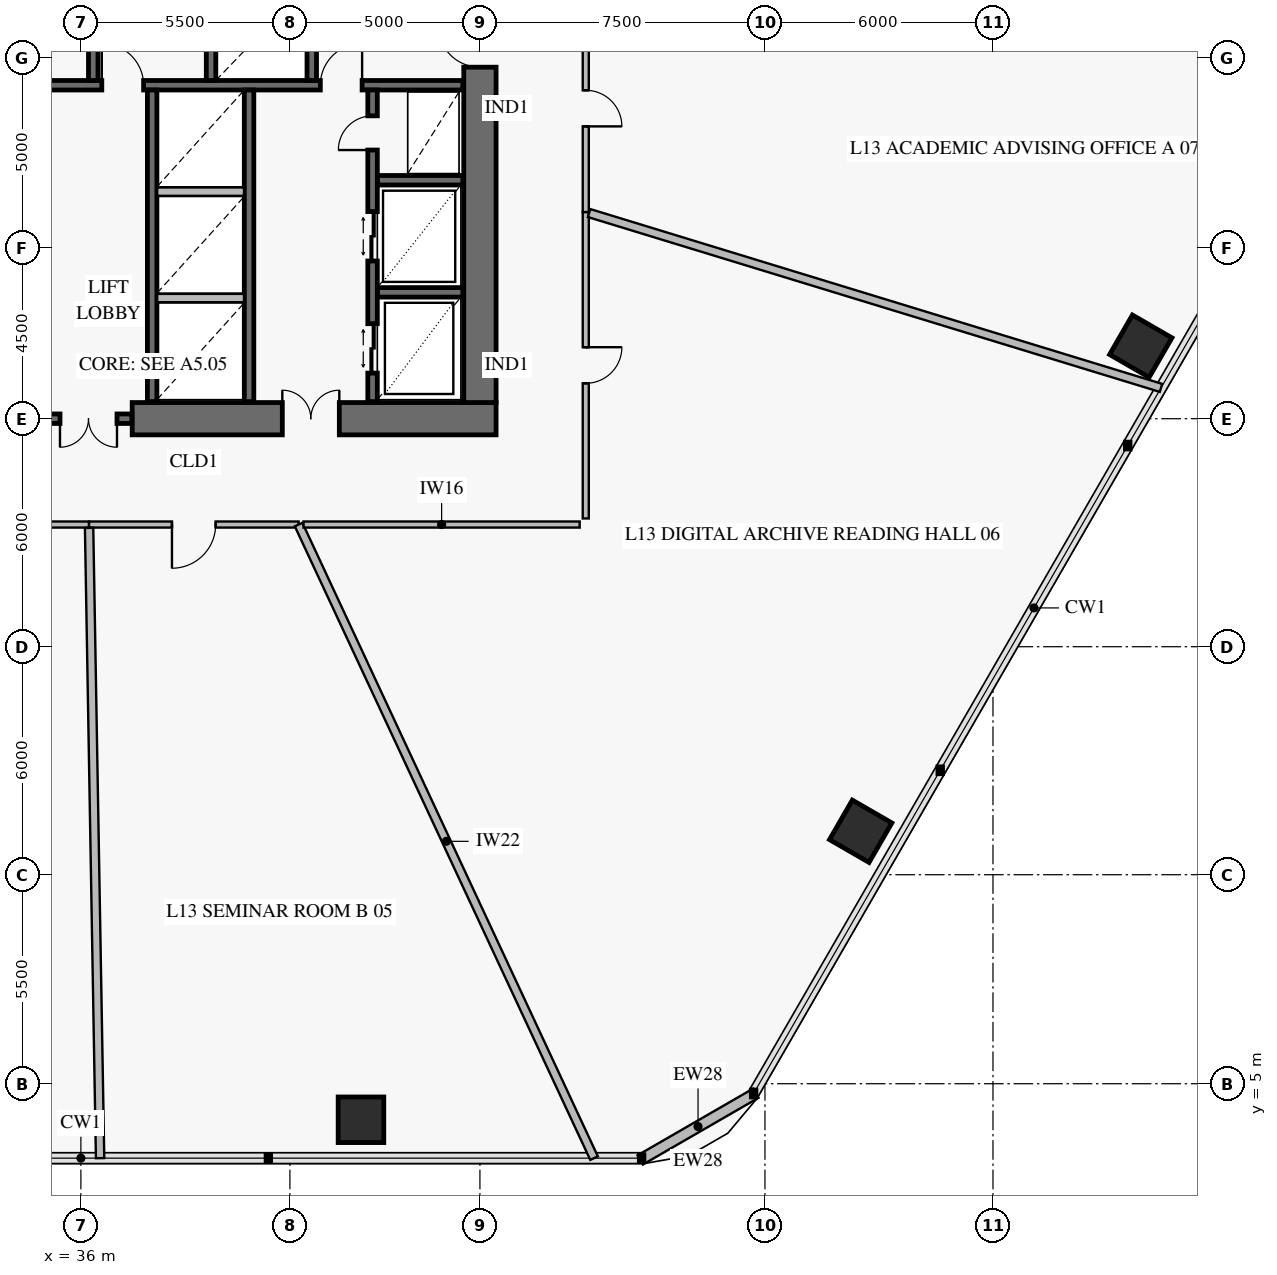
"""IFC4 building model, lengths in metres.
Left out: names, types, materials, properties, quantities, classifications, styles, units other than length and angle.
Written with IfcOpenShell. Run it as: python <this file> out.ifc"""

import sys

from ifc_helpers import new_model, si_unit, direction, frame, frame_2d, origin, origin_2d, place, context, subcontext, project, spatial, rectangle, extrude, element, fill, save


model = new_model("IFC4")
c1 = context("Model", 3, precision=1e-05, world=origin(), true_north=direction((0.0, 1.0)))
c2 = subcontext(c1, "Body", "Model", "MODEL_VIEW")
j1 = project(units=[si_unit("LENGTHUNIT", "METRE"), si_unit("PLANEANGLEUNIT", "RADIAN")], contexts=[c1])
p1 = place(None, origin())
s1 = spatial("IfcSite", under=j1, at=p1, CompositionType="ELEMENT")
p2 = place(p1, origin())
s2 = spatial("IfcBuilding", under=s1, at=p2, CompositionType="ELEMENT")
p3 = place(p2, frame((0.0, 0.0, 54.0)))
s3 = spatial("IfcBuildingStorey", under=s2, at=p3, CompositionType="ELEMENT", Elevation=54.0)
p4 = place(p3, frame((37.35, 22.5, 0.0), z_axis=(0.0, 0.0, 1.0), x_axis=(1.0, 0.0, 0.0)))
e1 = element("IfcWall", 1, at=p4, inside=s3, PredefinedType="SHEAR", context=c2, shape_type="SweptSolid", body=[
    extrude(rectangle(XDim=9.575, YDim=0.85, at=frame_2d((4.788, 0.0))), origin(), (0.0, 0.0, 1.0), 4.2),
])
p5 = place(p4, frame((3.95, 0.0, 0.0)))
e2 = element("IfcOpeningElement", 2, at=p5, cuts=e1, PredefinedType="OPENING", context=c2, shape_type="SweptSolid", body=[
    extrude(rectangle(XDim=1.5, YDim=2.15, at=frame_2d((0.75, 1.075))), frame((0.0, 0.437, 0.0), z_axis=(0.0, -1.0, 0.0), x_axis=(1.0, 0.0, 0.0)), (0.0, 0.0, 1.0), 0.874),
])
p6 = place(p3, frame((46.5, 22.925, 0.0), z_axis=(0.0, 0.0, 1.0), x_axis=(0.0, 1.0, 0.0)))
e3 = element("IfcWall", 3, at=p6, inside=s3, PredefinedType="SHEAR", context=c2, shape_type="SweptSolid", body=[
    extrude(rectangle(XDim=18.15, YDim=0.85, at=frame_2d((9.075, 0.0))), origin(), (0.0, 0.0, 1.0), 4.2),
])
p7 = place(p6, frame((8.825, 0.0, 0.0)))
e4 = element("IfcOpeningElement", 4, at=p7, cuts=e3, PredefinedType="OPENING", context=c2, shape_type="SweptSolid", body=[
    extrude(rectangle(XDim=1.1, YDim=2.15, at=frame_2d((0.55, 1.075))), frame((0.0, 0.437, 0.0), z_axis=(0.0, -1.0, 0.0), x_axis=(1.0, 0.0, 0.0)), (0.0, 0.0, 1.0), 0.874),
])
for number, where, z_axis, x_axis in (
    (5, (43.37, 4.052, 0.0), (0.0, 0.0, 1.0), (1.0, 0.0, 0.0)),
    (6, (56.519, 11.643, 0.0), (0.0, 0.0, 1.0), (0.5, 0.866, 0.0)),
    (7, (63.889, 24.408, 0.0), (0.0, 0.0, 1.0), (0.5, 0.866, 0.0)),
):
    element("IfcColumn", number, at=place(p3, frame(where, z_axis=z_axis, x_axis=x_axis)), inside=s3, PredefinedType="COLUMN", context=c2, shape_type="SweptSolid", body=[
        extrude(rectangle(XDim=1.2, YDim=1.2, at=origin_2d()), origin(), (0.0, 0.0, 1.0), 3.92),
    ])
p8 = place(p3, frame((53.761, 4.751, 0.0), z_axis=(0.0, 0.0, 1.0), x_axis=(-0.866007452331, -0.500031091541, 0.0)))
e8 = element("IfcWall", 8, at=p8, inside=s3, PredefinedType="SOLIDWALL", context=c2, shape_type="SweptSolid", body=[
    extrude(rectangle(XDim=3.515, YDim=0.28, at=frame_2d((1.757, 0.0))), origin(), (0.0, 0.0, 1.0), 3.92),
])
p9 = place(p3, frame((35.06, 22.5, 0.0), z_axis=(0.0, 0.0, 1.0), x_axis=(1.0, 0.0, 0.0)))
e9 = element("IfcWall", 9, at=p9, inside=s3, PredefinedType="SOLIDWALL", context=c2, shape_type="SweptSolid", body=[
    extrude(rectangle(XDim=2.28, YDim=0.25, at=frame_2d((1.14, 0.0))), origin(), (0.0, 0.0, 1.0), 4.2),
])
p10 = place(p9, frame((0.39, 0.0, 0.0)))
e10 = element("IfcOpeningElement", 10, at=p10, cuts=e9, PredefinedType="OPENING", context=c2, shape_type="SweptSolid", body=[
    extrude(rectangle(XDim=1.5, YDim=2.15, at=frame_2d((0.75, 1.075))), frame((0.0, 0.137, 0.0), z_axis=(0.0, -1.0, 0.0), x_axis=(1.0, 0.0, 0.0)), (0.0, 0.0, 1.0), 0.274),
])
p11 = place(p3, frame((25.95, 31.275, 0.0), z_axis=(0.0, 0.0, 1.0), x_axis=(1.0, 0.0, 0.0)))
e11 = element("IfcWall", 11, at=p11, inside=s3, PredefinedType="SOLIDWALL", context=c2, shape_type="SweptSolid", body=[
    extrude(rectangle(XDim=20.1, YDim=0.25, at=frame_2d((10.05, 0.0))), origin(), (0.0, 0.0, 1.0), 4.2),
])
p12 = place(p11, frame((2.6, 0.0, 0.0)))
e12 = element("IfcOpeningElement", 12, at=p12, cuts=e11, PredefinedType="OPENING", context=c2, shape_type="SweptSolid", body=[
    extrude(rectangle(XDim=1.1, YDim=2.15, at=frame_2d((0.55, 1.075))), frame((0.0, 0.137, 0.0), z_axis=(0.0, -1.0, 0.0), x_axis=(1.0, 0.0, 0.0)), (0.0, 0.0, 1.0), 0.274),
])
p13 = place(p11, frame((10.6, 0.0, 0.0)))
e13 = element("IfcOpeningElement", 13, at=p13, cuts=e11, PredefinedType="OPENING", context=c2, shape_type="SweptSolid", body=[
    extrude(rectangle(XDim=1.1, YDim=2.15, at=frame_2d((0.55, 1.075))), frame((0.0, 0.137, 0.0), z_axis=(0.0, -1.0, 0.0), x_axis=(1.0, 0.0, 0.0)), (0.0, 0.0, 1.0), 0.274),
])
p14 = place(p11, frame((16.35, 0.0, 0.0)))
e14 = element("IfcOpeningElement", 14, at=p14, cuts=e11, PredefinedType="OPENING", context=c2, shape_type="SweptSolid", body=[
    extrude(rectangle(XDim=1.1, YDim=2.15, at=frame_2d((0.55, 1.075))), frame((0.0, 0.137, 0.0), z_axis=(0.0, -1.0, 0.0), x_axis=(1.0, 0.0, 0.0)), (0.0, 0.0, 1.0), 0.274),
])
p15 = place(p3, frame((42.075, 31.4, 0.0), z_axis=(0.0, 0.0, 1.0), x_axis=(0.0, 1.0, 0.0)))
e15 = element("IfcWall", 15, at=p15, inside=s3, PredefinedType="SOLIDWALL", context=c2, shape_type="SweptSolid", body=[
    extrude(rectangle(XDim=9.7, YDim=0.25, at=frame_2d((4.85, 0.0))), origin(), (0.0, 0.0, 1.0), 4.2),
])
p16 = place(p3, frame((36.325, 31.4, 0.0), z_axis=(0.0, 0.0, 1.0), x_axis=(0.0, 1.0, 0.0)))
e16 = element("IfcWall", 16, at=p16, inside=s3, PredefinedType="SOLIDWALL", context=c2, shape_type="SweptSolid", body=[
    extrude(rectangle(XDim=9.65, YDim=0.25, at=frame_2d((4.825, 0.0))), origin(), (0.0, 0.0, 1.0), 4.2),
])
p17 = place(p16, frame((0.84, 0.0, 0.0)))
e17 = element("IfcOpeningElement", 17, at=p17, cuts=e16, PredefinedType="OPENING", context=c2, shape_type="SweptSolid", body=[
    extrude(rectangle(XDim=0.9, YDim=2.1, at=frame_2d((0.45, 1.05))), frame((0.0, 0.137, 0.0), z_axis=(0.0, -1.0, 0.0), x_axis=(1.0, 0.0, 0.0)), (0.0, 0.0, 1.0), 0.274),
])
p18 = place(p16, frame((4.1, 0.0, 0.0)))
e18 = element("IfcOpeningElement", 18, at=p18, cuts=e16, PredefinedType="OPENING", context=c2, shape_type="SweptSolid", body=[
    extrude(rectangle(XDim=0.9, YDim=2.1, at=frame_2d((0.45, 1.05))), frame((0.0, 0.137, 0.0), z_axis=(0.0, -1.0, 0.0), x_axis=(1.0, 0.0, 0.0)), (0.0, 0.0, 1.0), 0.274),
])
p19 = place(p16, frame((7.61, 0.0, 0.0)))
e19 = element("IfcOpeningElement", 19, at=p19, cuts=e16, PredefinedType="OPENING", context=c2, shape_type="SweptSolid", body=[
    extrude(rectangle(XDim=0.9, YDim=2.1, at=frame_2d((0.45, 1.05))), frame((0.0, 0.137, 0.0), z_axis=(0.0, -1.0, 0.0), x_axis=(1.0, 0.0, 0.0)), (0.0, 0.0, 1.0), 0.274),
])
p20 = place(p3, frame((39.425, 31.4, 0.0), z_axis=(0.0, 0.0, 1.0), x_axis=(0.0, 1.0, 0.0)))
e20 = element("IfcWall", 20, at=p20, inside=s3, PredefinedType="SOLIDWALL", context=c2, shape_type="SweptSolid", body=[
    extrude(rectangle(XDim=9.65, YDim=0.25, at=frame_2d((4.825, 0.0))), origin(), (0.0, 0.0, 1.0), 4.2),
])
p21 = place(p20, frame((8.47, 0.0, 0.0)))
e21 = element("IfcOpeningElement", 21, at=p21, cuts=e20, PredefinedType="OPENING", context=c2, shape_type="SweptSolid", body=[
    extrude(rectangle(XDim=0.9, YDim=2.1, at=frame_2d((0.45, 1.05))), frame((0.0, 0.137, 0.0), z_axis=(0.0, -1.0, 0.0), x_axis=(1.0, 0.0, 0.0)), (0.0, 0.0, 1.0), 0.274),
])
for number, where, z_axis, x_axis in (
    (22, (37.875, 22.95, 0.0), (0.0, 0.0, 1.0), (0.0, 1.0, 0.0)),
    (23, (40.425, 22.95, 0.0), (0.0, 0.0, 1.0), (0.0, 1.0, 0.0)),
):
    element("IfcWall", number, at=place(p3, frame(where, z_axis=z_axis, x_axis=x_axis)), inside=s3, PredefinedType="SOLIDWALL", context=c2, shape_type="SweptSolid", body=[
        extrude(rectangle(XDim=8.2, YDim=0.25, at=frame_2d((4.1, 0.0))), origin(), (0.0, 0.0, 1.0), 4.2),
    ])
for number, where, z_axis, x_axis in (
    (24, (43.8, 25.825, 0.0), (0.0, 0.0, 1.0), (1.0, 0.0, 0.0)),
    (25, (43.8, 28.775, 0.0), (0.0, 0.0, 1.0), (1.0, 0.0, 0.0)),
):
    element("IfcWall", number, at=place(p3, frame(where, z_axis=z_axis, x_axis=x_axis)), inside=s3, PredefinedType="SOLIDWALL", context=c2, shape_type="SweptSolid", body=[
        extrude(rectangle(XDim=2.25, YDim=0.25, at=frame_2d((1.125, 0.0))), origin(), (0.0, 0.0, 1.0), 4.2),
    ])
p22 = place(p3, frame((43.675, 22.95, 0.0), z_axis=(0.0, 0.0, 1.0), x_axis=(0.0, 1.0, 0.0)))
e26 = element("IfcWall", 26, at=p22, inside=s3, PredefinedType="SOLIDWALL", context=c2, shape_type="SweptSolid", body=[
    extrude(rectangle(XDim=8.2, YDim=0.25, at=frame_2d((4.1, 0.0))), origin(), (0.0, 0.0, 1.0), 4.2),
])
p23 = place(p22, frame((0.75, 0.0, 0.0)))
e27 = element("IfcOpeningElement", 27, at=p23, cuts=e26, PredefinedType="OPENING", context=c2, shape_type="SweptSolid", body=[
    extrude(rectangle(XDim=1.3, YDim=2.3, at=frame_2d((0.65, 1.15))), frame((0.0, 0.137, 0.0), z_axis=(0.0, -1.0, 0.0), x_axis=(1.0, 0.0, 0.0)), (0.0, 0.0, 1.0), 0.274),
])
p24 = place(p22, frame((3.7, 0.0, 0.0)))
e28 = element("IfcOpeningElement", 28, at=p24, cuts=e26, PredefinedType="OPENING", context=c2, shape_type="SweptSolid", body=[
    extrude(rectangle(XDim=1.3, YDim=2.3, at=frame_2d((0.65, 1.15))), frame((0.0, 0.137, 0.0), z_axis=(0.0, -1.0, 0.0), x_axis=(1.0, 0.0, 0.0)), (0.0, 0.0, 1.0), 0.274),
])
p25 = place(p22, frame((6.62, 0.0, 0.0)))
e29 = element("IfcOpeningElement", 29, at=p25, cuts=e26, PredefinedType="OPENING", context=c2, shape_type="SweptSolid", body=[
    extrude(rectangle(XDim=0.9, YDim=2.1, at=frame_2d((0.45, 1.05))), frame((0.0, 0.137, 0.0), z_axis=(0.0, -1.0, 0.0), x_axis=(1.0, 0.0, 0.0)), (0.0, 0.0, 1.0), 0.274),
])
p26 = place(p3, frame((30.785, 19.715, 0.0), z_axis=(0.0, 0.0, 1.0), x_axis=(1.0, 0.0, 0.0)))
e30 = element("IfcWall", 30, at=p26, inside=s3, PredefinedType="PARTITIONING", context=c2, shape_type="SweptSolid", body=[
    extrude(rectangle(XDim=5.429, YDim=0.16, at=frame_2d((2.714, 0.0))), origin(), (0.0, 0.0, 1.0), 3.22),
])
p27 = place(p26, frame((2.139, 0.0, 0.0)))
e31 = element("IfcOpeningElement", 31, at=p27, cuts=e30, PredefinedType="OPENING", context=c2, shape_type="SweptSolid", body=[
    extrude(rectangle(XDim=1.15, YDim=2.2, at=frame_2d((0.575, 1.1))), frame((0.0, 0.092, 0.0), z_axis=(0.0, -1.0, 0.0), x_axis=(1.0, 0.0, 0.0)), (0.0, 0.0, 1.0), 0.184),
])
p28 = place(p3, frame((36.214, 19.715, 0.0), z_axis=(0.0, 0.0, 1.0), x_axis=(1.0, 0.0, 0.0)))
e32 = element("IfcWall", 32, at=p28, inside=s3, PredefinedType="PARTITIONING", context=c2, shape_type="SweptSolid", body=[
    extrude(rectangle(XDim=5.514, YDim=0.16, at=frame_2d((2.757, 0.0))), origin(), (0.0, 0.0, 1.0), 3.22),
])
p29 = place(p28, frame((2.182, 0.0, 0.0)))
e33 = element("IfcOpeningElement", 33, at=p29, cuts=e32, PredefinedType="OPENING", context=c2, shape_type="SweptSolid", body=[
    extrude(rectangle(XDim=1.15, YDim=2.2, at=frame_2d((0.575, 1.1))), frame((0.0, 0.092, 0.0), z_axis=(0.0, -1.0, 0.0), x_axis=(1.0, 0.0, 0.0)), (0.0, 0.0, 1.0), 0.184),
])
p30 = place(p3, frame((49.285, 19.875, 0.0), z_axis=(0.0, 0.0, 1.0), x_axis=(0.0, 1.0, 0.0)))
e34 = element("IfcWall", 34, at=p30, inside=s3, PredefinedType="PARTITIONING", context=c2, shape_type="SweptSolid", body=[
    extrude(rectangle(XDim=8.063, YDim=0.16, at=frame_2d((4.032, 0.0))), origin(), (0.0, 0.0, 1.0), 3.92),
])
p31 = place(p30, frame((3.557, 0.0, 0.0)))
e35 = element("IfcOpeningElement", 35, at=p31, cuts=e34, PredefinedType="OPENING", context=c2, shape_type="SweptSolid", body=[
    extrude(rectangle(XDim=0.95, YDim=2.1, at=frame_2d((0.475, 1.05))), frame((0.0, 0.092, 0.0), z_axis=(0.0, -1.0, 0.0), x_axis=(1.0, 0.0, 0.0)), (0.0, 0.0, 1.0), 0.184),
])
p32 = place(p3, frame((49.285, 27.938, 0.0), z_axis=(0.0, 0.0, 1.0), x_axis=(0.0, 1.0, 0.0)))
e36 = element("IfcWall", 36, at=p32, inside=s3, PredefinedType="PARTITIONING", context=c2, shape_type="SweptSolid", body=[
    extrude(rectangle(XDim=5.458, YDim=0.16, at=frame_2d((2.729, 0.0))), origin(), (0.0, 0.0, 1.0), 3.22),
])
p33 = place(p32, frame((2.254, 0.0, 0.0)))
e37 = element("IfcOpeningElement", 37, at=p33, cuts=e36, PredefinedType="OPENING", context=c2, shape_type="SweptSolid", body=[
    extrude(rectangle(XDim=0.95, YDim=2.1, at=frame_2d((0.475, 1.05))), frame((0.0, 0.092, 0.0), z_axis=(0.0, -1.0, 0.0), x_axis=(1.0, 0.0, 0.0)), (0.0, 0.0, 1.0), 0.184),
])
for number, where, z_axis, x_axis in (
    (38, (38.008, 25.675, 0.0), (0.0, 0.0, 1.0), (1.0, 0.0, 0.0)),
    (39, (38.008, 28.475, 0.0), (0.0, 0.0, 1.0), (1.0, 0.0, 0.0)),
):
    element("IfcWall", number, at=place(p3, frame(where, z_axis=z_axis, x_axis=x_axis)), inside=s3, PredefinedType="PARTITIONING", context=c2, shape_type="SweptSolid", body=[
        extrude(rectangle(XDim=2.284, YDim=0.22, at=frame_2d((1.142, 0.0))), origin(), (0.0, 0.0, 1.0), 3.92),
    ])
p34 = place(p3, frame((36.216, 19.627, 0.0), z_axis=(0.0, 0.0, 1.0), x_axis=(0.01745546123, -0.99984764183, 0.0)))
e40 = element("IfcWall", 40, at=p34, inside=s3, PredefinedType="PARTITIONING", context=c2, shape_type="SweptSolid", body=[
    extrude(rectangle(XDim=16.588, YDim=0.22, at=frame_2d((8.294, 0.0))), origin(), (0.0, 0.0, 1.0), 3.17),
])
p35 = place(p3, frame((41.729, 19.715, 0.0), z_axis=(0.0, 0.0, 1.0), x_axis=(0.422623913369, -0.906305151617, 0.0)))
e41 = element("IfcWall", 41, at=p35, inside=s3, PredefinedType="PARTITIONING", context=c2, shape_type="SweptSolid", body=[
    extrude(rectangle(XDim=18.397, YDim=0.22, at=frame_2d((9.199, 0.0))), origin(), (0.0, 0.0, 1.0), 3.17),
])
p36 = place(p3, frame((41.859, 19.715, 0.0), z_axis=(0.0, 0.0, 1.0), x_axis=(1.0, 0.0, 0.0)))
e42 = element("IfcWall", 42, at=p36, inside=s3, PredefinedType="PARTITIONING", context=c2, shape_type="SweptSolid", body=[
    extrude(rectangle(XDim=7.266, YDim=0.16, at=frame_2d((3.633, 0.0))), origin(), (0.0, 0.0, 1.0), 3.22),
])
p37 = place(p3, frame((49.373, 27.912, 0.0), z_axis=(0.0, 0.0, 1.0), x_axis=(0.956304467386, -0.292372648614, 0.0)))
e43 = element("IfcWall", 43, at=p37, inside=s3, PredefinedType="PARTITIONING", context=c2, shape_type="SweptSolid", body=[
    extrude(rectangle(XDim=15.736, YDim=0.22, at=frame_2d((7.868, 0.0))), origin(), (0.0, 0.0, 1.0), 3.17),
])
p38 = place(p7, origin())
e44 = element("IfcDoor", 44, at=p38, inside=s3, OperationType="SINGLE_SWING_RIGHT", PredefinedType="USERDEFINED", context=c2, shape_type="SweptSolid", body=[
    extrude(rectangle(XDim=1.1, YDim=2.15, at=frame_2d((0.55, 1.075))), frame((0.0, 0.025, 0.0), z_axis=(0.0, -1.0, 0.0), x_axis=(1.0, 0.0, 0.0)), (0.0, 0.0, 1.0), 0.05),
])
fill(e4, e44)
p39 = place(p5, origin())
e45 = element("IfcDoor", 45, at=p39, inside=s3, OperationType="DOUBLE_DOOR_SINGLE_SWING", PredefinedType="DOOR", context=c2, shape_type="SweptSolid", body=[
    extrude(rectangle(XDim=1.5, YDim=2.15, at=frame_2d((0.75, 1.075))), frame((0.0, 0.025, 0.0), z_axis=(0.0, -1.0, 0.0), x_axis=(1.0, 0.0, 0.0)), (0.0, 0.0, 1.0), 0.05),
])
fill(e2, e45)
p40 = place(p10, frame((1.5, 0.0, 0.0), z_axis=(0.0, 0.0, 1.0), x_axis=(-1.0, 0.0, 0.0)))
e46 = element("IfcDoor", 46, at=p40, inside=s3, OperationType="DOUBLE_DOOR_SINGLE_SWING", PredefinedType="DOOR", context=c2, shape_type="SweptSolid", body=[
    extrude(rectangle(XDim=1.5, YDim=2.15, at=frame_2d((0.75, 1.075))), frame((0.0, 0.025, 0.0), z_axis=(0.0, -1.0, 0.0), x_axis=(1.0, 0.0, 0.0)), (0.0, 0.0, 1.0), 0.05),
])
fill(e10, e46)
p41 = place(p13, origin())
e47 = element("IfcDoor", 47, at=p41, inside=s3, OperationType="SINGLE_SWING_LEFT", PredefinedType="USERDEFINED", context=c2, shape_type="SweptSolid", body=[
    extrude(rectangle(XDim=1.1, YDim=2.15, at=frame_2d((0.55, 1.075))), frame((0.0, 0.025, 0.0), z_axis=(0.0, -1.0, 0.0), x_axis=(1.0, 0.0, 0.0)), (0.0, 0.0, 1.0), 0.05),
])
fill(e13, e47)
p42 = place(p14, origin())
e48 = element("IfcDoor", 48, at=p42, inside=s3, OperationType="SINGLE_SWING_RIGHT", PredefinedType="USERDEFINED", context=c2, shape_type="SweptSolid", body=[
    extrude(rectangle(XDim=1.1, YDim=2.15, at=frame_2d((0.55, 1.075))), frame((0.0, 0.025, 0.0), z_axis=(0.0, -1.0, 0.0), x_axis=(1.0, 0.0, 0.0)), (0.0, 0.0, 1.0), 0.05),
])
fill(e14, e48)
p43 = place(p23, origin())
e49 = element("IfcDoor", 49, at=p43, inside=s3, OperationType="DOUBLE_DOOR_SLIDING", PredefinedType="DOOR", context=c2, shape_type="SweptSolid", body=[
    extrude(rectangle(XDim=1.3, YDim=2.3, at=frame_2d((0.65, 1.15))), frame((0.0, 0.025, 0.0), z_axis=(0.0, -1.0, 0.0), x_axis=(1.0, 0.0, 0.0)), (0.0, 0.0, 1.0), 0.05),
])
fill(e27, e49)
p44 = place(p24, origin())
e50 = element("IfcDoor", 50, at=p44, inside=s3, OperationType="DOUBLE_DOOR_SLIDING", PredefinedType="DOOR", context=c2, shape_type="SweptSolid", body=[
    extrude(rectangle(XDim=1.3, YDim=2.3, at=frame_2d((0.65, 1.15))), frame((0.0, 0.025, 0.0), z_axis=(0.0, -1.0, 0.0), x_axis=(1.0, 0.0, 0.0)), (0.0, 0.0, 1.0), 0.05),
])
fill(e28, e50)
p45 = place(p25, origin())
e51 = element("IfcDoor", 51, at=p45, inside=s3, OperationType="SINGLE_SWING_LEFT", PredefinedType="DOOR", context=c2, shape_type="SweptSolid", body=[
    extrude(rectangle(XDim=0.9, YDim=2.1, at=frame_2d((0.45, 1.05))), frame((0.0, 0.025, 0.0), z_axis=(0.0, -1.0, 0.0), x_axis=(1.0, 0.0, 0.0)), (0.0, 0.0, 1.0), 0.05),
])
fill(e29, e51)
p46 = place(p29, frame((1.15, 0.0, 0.0), z_axis=(0.0, 0.0, 1.0), x_axis=(-1.0, 0.0, 0.0)))
e52 = element("IfcDoor", 52, at=p46, inside=s3, OperationType="SINGLE_SWING_RIGHT", PredefinedType="DOOR", context=c2, shape_type="SweptSolid", body=[
    extrude(rectangle(XDim=1.15, YDim=2.2, at=frame_2d((0.575, 1.1))), frame((0.0, 0.025, 0.0), z_axis=(0.0, -1.0, 0.0), x_axis=(1.0, 0.0, 0.0)), (0.0, 0.0, 1.0), 0.05),
])
fill(e33, e52)
p47 = place(p31, frame((0.95, 0.0, 0.0), z_axis=(0.0, 0.0, 1.0), x_axis=(-1.0, 0.0, 0.0)))
e53 = element("IfcDoor", 53, at=p47, inside=s3, OperationType="SINGLE_SWING_LEFT", PredefinedType="DOOR", context=c2, shape_type="SweptSolid", body=[
    extrude(rectangle(XDim=0.95, YDim=2.1, at=frame_2d((0.475, 1.05))), frame((0.0, 0.025, 0.0), z_axis=(0.0, -1.0, 0.0), x_axis=(1.0, 0.0, 0.0)), (0.0, 0.0, 1.0), 0.05),
])
fill(e35, e53)
p48 = place(p33, frame((0.95, 0.0, 0.0), z_axis=(0.0, 0.0, 1.0), x_axis=(-1.0, 0.0, 0.0)))
e54 = element("IfcDoor", 54, at=p48, inside=s3, OperationType="SINGLE_SWING_RIGHT", PredefinedType="DOOR", context=c2, shape_type="SweptSolid", body=[
    extrude(rectangle(XDim=0.95, YDim=2.1, at=frame_2d((0.475, 1.05))), frame((0.0, 0.025, 0.0), z_axis=(0.0, -1.0, 0.0), x_axis=(1.0, 0.0, 0.0)), (0.0, 0.0, 1.0), 0.05),
])
fill(e37, e54)
save(model, sys.argv[1])
